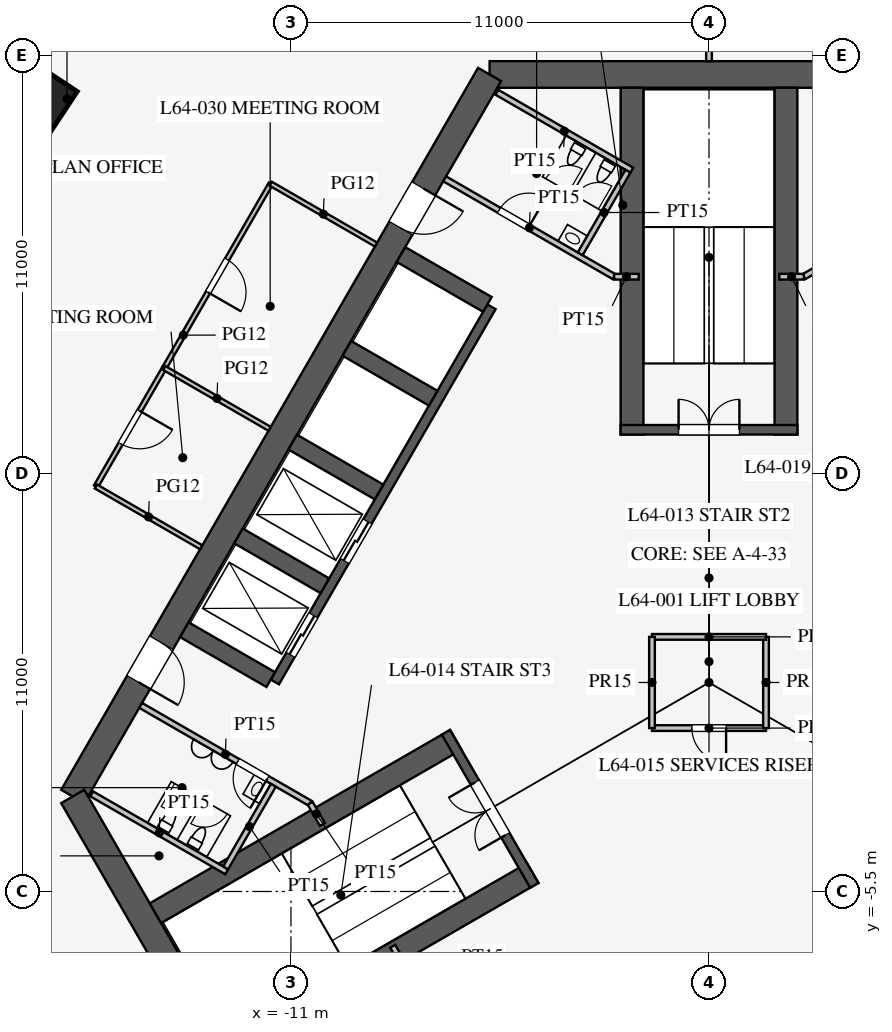
"""IFC4 building model, lengths in metres.
Left out: names, types, materials, properties, quantities, classifications, styles, units other than length and angle.
Written with IfcOpenShell. Run it as: python <this file> out.ifc"""

import sys

from ifc_helpers import new_model, si_unit, direction, frame, frame_2d, origin, origin_2d, place, context, subcontext, project, spatial, rectangle, extrude, element, fill, save


model = new_model("IFC4")
c1 = context("Model", 3, precision=1e-05, world=origin(), true_north=direction((0.0, 1.0)))
c2 = subcontext(c1, "Body", "Model", "MODEL_VIEW")
j1 = project(units=[si_unit("LENGTHUNIT", "METRE"), si_unit("PLANEANGLEUNIT", "RADIAN")], contexts=[c1])
p1 = place(None, origin())
s1 = spatial("IfcSite", under=j1, at=p1, CompositionType="ELEMENT")
p2 = place(p1, origin())
s2 = spatial("IfcBuilding", under=s1, at=p2, CompositionType="ELEMENT")
p3 = place(p2, frame((0.0, 0.0, 280.5)))
s3 = spatial("IfcBuildingStorey", under=s2, at=p3, CompositionType="ELEMENT", Elevation=280.5)
p4 = place(p3, frame((-17.594, 15.354, 0.0), z_axis=(0.0, 0.0, 1.0), x_axis=(-0.551523797289, -0.834159158089, 0.0)))
e1 = element("IfcColumn", 1, at=p4, inside=s3, PredefinedType="COLUMN", context=c2, shape_type="SweptSolid", body=[
    extrude(rectangle(XDim=1.4, YDim=1.4, at=origin_2d()), origin(), (0.0, 0.0, 1.0), 4.2),
])
p5 = place(p3, frame((5.773, 16.0, 0.0), z_axis=(0.0, 0.0, 1.0), x_axis=(-1.0, 0.0, 0.0)))
e2 = element("IfcWall", 2, at=p5, inside=s3, PredefinedType="SHEAR", context=c2, shape_type="SweptSolid", body=[
    extrude(rectangle(XDim=11.547, YDim=0.7, at=frame_2d((5.773, 0.0))), origin(), (0.0, 0.0, 1.0), 4.2),
])
p6 = place(p3, frame((-5.773, 16.0, 0.0), z_axis=(0.0, 0.0, 1.0), x_axis=(-0.500002442456, -0.866023993627, 0.0)))
e3 = element("IfcWall", 3, at=p6, inside=s3, PredefinedType="SHEAR", context=c2, shape_type="SweptSolid", body=[
    extrude(rectangle(XDim=21.939, YDim=0.7, at=frame_2d((10.97, 0.0))), origin(), (0.0, 0.0, 1.0), 4.2),
])
p7 = place(p6, frame((17.27, 0.0, 0.0)))
e4 = element("IfcOpeningElement", 4, at=p7, cuts=e3, PredefinedType="OPENING", context=c2, shape_type="SweptSolid", body=[
    extrude(rectangle(XDim=1.2, YDim=2.1, at=frame_2d((0.6, 1.05))), frame((0.0, 0.36, 0.0), z_axis=(0.0, -1.0, 0.0), x_axis=(1.0, 0.0, 0.0)), (0.0, 0.0, 1.0), 0.72),
])
p8 = place(p6, frame((3.47, 0.0, 0.0)))
e5 = element("IfcOpeningElement", 5, at=p8, cuts=e3, PredefinedType="OPENING", context=c2, shape_type="SweptSolid", body=[
    extrude(rectangle(XDim=1.2, YDim=2.1, at=frame_2d((0.6, 1.05))), frame((0.0, 0.36, 0.0), z_axis=(0.0, -1.0, 0.0), x_axis=(1.0, 0.0, 0.0)), (0.0, 0.0, 1.0), 0.72),
])
p9 = place(p3, frame((-16.743, -3.0, 0.0), z_axis=(0.0, 0.0, 1.0), x_axis=(0.499995765644, -0.866027848477, 0.0)))
e6 = element("IfcWall", 6, at=p9, inside=s3, PredefinedType="SHEAR", context=c2, shape_type="SweptSolid", body=[
    extrude(rectangle(XDim=11.547, YDim=0.7, at=frame_2d((5.773, 0.0))), origin(), (0.0, 0.0, 1.0), 4.2),
])
p10 = place(p3, frame((-5.724, 9.886, 0.0), z_axis=(0.0, 0.0, 1.0), x_axis=(-0.500001763848, -0.866024385424, 0.0)))
e7 = element("IfcWall", 7, at=p10, inside=s3, PredefinedType="SHEAR", context=c2, shape_type="SweptSolid", body=[
    extrude(rectangle(XDim=11.4, YDim=0.25, at=frame_2d((5.7, 0.0))), origin(), (0.0, 0.0, 1.0), 4.2),
])
p11 = place(p10, frame((6.525, 0.0, 0.0)))
e8 = element("IfcOpeningElement", 8, at=p11, cuts=e7, PredefinedType="OPENING", context=c2, shape_type="SweptSolid", body=[
    extrude(rectangle(XDim=1.2, YDim=2.2, at=frame_2d((0.6, 1.1))), frame((0.0, 0.135, 0.0), z_axis=(0.0, -1.0, 0.0), x_axis=(1.0, 0.0, 0.0)), (0.0, 0.0, 1.0), 0.27),
])
p12 = place(p10, frame((9.375, 0.0, 0.0)))
e9 = element("IfcOpeningElement", 9, at=p12, cuts=e7, PredefinedType="OPENING", context=c2, shape_type="SweptSolid", body=[
    extrude(rectangle(XDim=1.2, YDim=2.2, at=frame_2d((0.6, 1.1))), frame((0.0, 0.135, 0.0), z_axis=(0.0, -1.0, 0.0), x_axis=(1.0, 0.0, 0.0)), (0.0, 0.0, 1.0), 0.27),
])
for number, where, z_axis, x_axis in (
    (10, (-5.832, 9.949, 0.0), (0.0, 0.0, 1.0), (-0.866, 0.5, 0.0)),
    (11, (-7.257, 7.481, 0.0), (0.0, 0.0, 1.0), (-0.866, 0.5, 0.0)),
    (12, (-8.682, 5.012, 0.0), (0.0, 0.0, 1.0), (-0.866, 0.5, 0.0)),
    (13, (-10.107, 2.544, 0.0), (0.0, 0.0, 1.0), (-0.866, 0.5, 0.0)),
    (14, (-11.532, 0.076, 0.0), (0.0, 0.0, 1.0), (-0.866, 0.5, 0.0)),
):
    element("IfcWall", number, at=place(p3, frame(where, z_axis=z_axis, x_axis=x_axis)), inside=s3, PredefinedType="SHEAR", context=c2, shape_type="SweptSolid", body=[
        extrude(rectangle(XDim=2.625, YDim=0.45, at=frame_2d((1.312, 0.0))), origin(), (0.0, 0.0, 1.0), 4.2),
    ])
for number, where, z_axis, x_axis in (
    (15, (2.025, 6.525, 0.0), (0.0, 0.0, 1.0), (0.0, 1.0, 0.0)),
    (16, (-2.025, 6.525, 0.0), (0.0, 0.0, 1.0), (0.0, 1.0, 0.0)),
):
    element("IfcWall", number, at=place(p3, frame(where, z_axis=z_axis, x_axis=x_axis)), inside=s3, PredefinedType="SHEAR", context=c2, shape_type="SweptSolid", body=[
        extrude(rectangle(XDim=9.125, YDim=0.6, at=frame_2d((4.562, 0.0))), origin(), (0.0, 0.0, 1.0), 4.2),
    ])
p13 = place(p3, frame((2.325, 6.65, 0.0), z_axis=(0.0, 0.0, 1.0), x_axis=(-1.0, 0.0, 0.0)))
e17 = element("IfcWall", 17, at=p13, inside=s3, PredefinedType="SHEAR", context=c2, shape_type="SweptSolid", body=[
    extrude(rectangle(XDim=4.65, YDim=0.25, at=frame_2d((2.325, 0.0))), origin(), (0.0, 0.0, 1.0), 4.2),
])
p14 = place(p13, frame((1.525, 0.0, 0.0)))
e18 = element("IfcOpeningElement", 18, at=p14, cuts=e17, PredefinedType="OPENING", context=c2, shape_type="SweptSolid", body=[
    extrude(rectangle(XDim=1.6, YDim=2.1, at=frame_2d((0.8, 1.05))), frame((0.0, 0.135, 0.0), z_axis=(0.0, -1.0, 0.0), x_axis=(1.0, 0.0, 0.0)), (0.0, 0.0, 1.0), 0.27),
])
for number, where, z_axis, x_axis in (
    (19, (-6.663, -1.509, 0.0), (0.0, 0.0, 1.0), (-0.866, -0.5, 0.0)),
    (20, (-4.638, -5.016, 0.0), (0.0, 0.0, 1.0), (-0.866, -0.5, 0.0)),
):
    element("IfcWall", number, at=place(p3, frame(where, z_axis=z_axis, x_axis=x_axis)), inside=s3, PredefinedType="SHEAR", context=c2, shape_type="SweptSolid", body=[
        extrude(rectangle(XDim=9.125, YDim=0.6, at=frame_2d((4.562, 0.0))), origin(), (0.0, 0.0, 1.0), 4.2),
    ])
p15 = place(p3, frame((-6.922, -1.312, 0.0), z_axis=(0.0, 0.0, 1.0), x_axis=(0.499984536904, -0.866034331223, 0.0)))
e21 = element("IfcWall", 21, at=p15, inside=s3, PredefinedType="SHEAR", context=c2, shape_type="SweptSolid", body=[
    extrude(rectangle(XDim=4.65, YDim=0.25, at=frame_2d((2.325, 0.0))), origin(), (0.0, 0.0, 1.0), 4.2),
])
p16 = place(p15, frame((1.525, 0.0, 0.0)))
e22 = element("IfcOpeningElement", 22, at=p16, cuts=e21, PredefinedType="OPENING", context=c2, shape_type="SweptSolid", body=[
    extrude(rectangle(XDim=1.6, YDim=2.1, at=frame_2d((0.8, 1.05))), frame((0.0, 0.135, 0.0), z_axis=(0.0, -1.0, 0.0), x_axis=(1.0, 0.0, 0.0)), (0.0, 0.0, 1.0), 0.27),
])
p17 = place(p3, frame((2.495, 10.678, 0.0), z_axis=(0.0, 0.0, 1.0), x_axis=(0.866037967349, 0.499978238636, 0.0)))
e23 = element("IfcWall", 23, at=p17, inside=s3, PredefinedType="PARTITIONING", context=c2, shape_type="SweptSolid", body=[
    extrude(rectangle(XDim=5.15, YDim=0.15, at=frame_2d((2.575, 0.0))), origin(), (0.0, 0.0, 1.0), 4.0),
])
p18 = place(p17, frame((2.6, 0.0, 0.0)))
e24 = element("IfcOpeningElement", 24, at=p18, cuts=e23, PredefinedType="OPENING", context=c2, shape_type="SweptSolid", body=[
    extrude(rectangle(XDim=0.9, YDim=2.1, at=frame_2d((0.45, 1.05))), frame((0.0, 0.085, 0.0), z_axis=(0.0, -1.0, 0.0), x_axis=(1.0, 0.0, 0.0)), (0.0, 0.0, 1.0), 0.17),
])
p19 = place(p3, frame((-10.495, -3.178, 0.0), z_axis=(0.0, 0.0, 1.0), x_axis=(-0.866037967349, 0.499978238636, 0.0)))
e25 = element("IfcWall", 25, at=p19, inside=s3, PredefinedType="PARTITIONING", context=c2, shape_type="SweptSolid", body=[
    extrude(rectangle(XDim=5.15, YDim=0.15, at=frame_2d((2.575, 0.0))), origin(), (0.0, 0.0, 1.0), 4.0),
])
p20 = place(p19, frame((1.3, 0.0, 0.0)))
e26 = element("IfcOpeningElement", 26, at=p20, cuts=e25, PredefinedType="OPENING", context=c2, shape_type="SweptSolid", body=[
    extrude(rectangle(XDim=0.9, YDim=2.1, at=frame_2d((0.45, 1.05))), frame((0.0, 0.085, 0.0), z_axis=(0.0, -1.0, 0.0), x_axis=(1.0, 0.0, 0.0)), (0.0, 0.0, 1.0), 0.17),
])
p21 = place(p3, frame((-2.495, 10.678, 0.0), z_axis=(0.0, 0.0, 1.0), x_axis=(-0.866037967349, 0.499978238636, 0.0)))
e27 = element("IfcWall", 27, at=p21, inside=s3, PredefinedType="PARTITIONING", context=c2, shape_type="SweptSolid", body=[
    extrude(rectangle(XDim=5.15, YDim=0.15, at=frame_2d((2.575, 0.0))), origin(), (0.0, 0.0, 1.0), 4.0),
])
p22 = place(p21, frame((2.6, 0.0, 0.0)))
e28 = element("IfcOpeningElement", 28, at=p22, cuts=e27, PredefinedType="OPENING", context=c2, shape_type="SweptSolid", body=[
    extrude(rectangle(XDim=0.9, YDim=2.1, at=frame_2d((0.45, 1.05))), frame((0.0, 0.085, 0.0), z_axis=(0.0, -1.0, 0.0), x_axis=(1.0, 0.0, 0.0)), (0.0, 0.0, 1.0), 0.17),
])
for number, where, z_axis, x_axis in (
    (29, (2.495, 10.678, 0.0), (0.0, 0.0, 1.0), (-1.0, 0.0, 0.0)),
    (30, (-2.495, 10.678, 0.0), (0.0, 0.0, 1.0), (1.0, 0.0, 0.0)),
):
    element("IfcWall", number, at=place(p3, frame(where, z_axis=z_axis, x_axis=x_axis)), inside=s3, PredefinedType="PARTITIONING", context=c2, shape_type="SweptSolid", body=[
        extrude(rectangle(XDim=0.645, YDim=0.15, at=frame_2d((0.323, 0.0))), origin(), (0.0, 0.0, 1.0), 4.0),
    ])
for number, where, z_axis, x_axis in (
    (31, (-10.495, -3.178, 0.0), (0.0, 0.0, 1.0), (0.5, -0.866, 0.0)),
    (32, (-8.0, -7.5, 0.0), (0.0, 0.0, 1.0), (-0.5, 0.866, 0.0)),
):
    element("IfcWall", number, at=place(p3, frame(where, z_axis=z_axis, x_axis=x_axis)), inside=s3, PredefinedType="PARTITIONING", context=c2, shape_type="SweptSolid", body=[
        extrude(rectangle(XDim=0.645, YDim=0.15, at=frame_2d((0.323, 0.0))), origin(), (0.0, 0.0, 1.0), 4.0),
    ])
p23 = place(p3, frame((-2.031, 13.482, 0.0), z_axis=(0.0, 0.0, 1.0), x_axis=(-0.866050731258, 0.499956128963, 0.0)))
e33 = element("IfcWall", 33, at=p23, inside=s3, PredefinedType="PARTITIONING", context=c2, shape_type="SweptSolid", body=[
    extrude(rectangle(XDim=4.1, YDim=0.15, at=frame_2d((2.05, 0.0))), origin(), (0.0, 0.0, 1.0), 4.0),
])
p24 = place(p3, frame((-3.389, 11.281, 0.0), z_axis=(0.0, 0.0, 1.0), x_axis=(0.499989096993, 0.866031698547, 0.0)))
e34 = element("IfcWall", 34, at=p24, inside=s3, PredefinedType="PARTITIONING", context=c2, shape_type="SweptSolid", body=[
    extrude(rectangle(XDim=2.51, YDim=0.15, at=frame_2d((1.255, 0.0))), origin(), (0.0, 0.0, 1.0), 4.0),
])
p25 = place(p3, frame((-12.691, -4.982, 0.0), z_axis=(0.0, 0.0, 1.0), x_axis=(-0.8660249478, 0.500000789788, 0.0)))
e35 = element("IfcWall", 35, at=p25, inside=s3, PredefinedType="PARTITIONING", context=c2, shape_type="SweptSolid", body=[
    extrude(rectangle(XDim=4.1, YDim=0.15, at=frame_2d((2.05, 0.0))), origin(), (0.0, 0.0, 1.0), 4.0),
])
p26 = place(p3, frame((-11.464, -2.706, 0.0), z_axis=(0.0, 0.0, 1.0), x_axis=(-0.50001992892, -0.866013897511, 0.0)))
e36 = element("IfcWall", 36, at=p26, inside=s3, PredefinedType="PARTITIONING", context=c2, shape_type="SweptSolid", body=[
    extrude(rectangle(XDim=2.51, YDim=0.15, at=frame_2d((1.255, 0.0))), origin(), (0.0, 0.0, 1.0), 4.0),
])
p27 = place(p3, frame((-1.5, -1.2, 0.0), z_axis=(0.0, 0.0, 1.0), x_axis=(1.0, 0.0, 0.0)))
e37 = element("IfcWall", 37, at=p27, inside=s3, PredefinedType="PARTITIONING", context=c2, shape_type="SweptSolid", body=[
    extrude(rectangle(XDim=3.0, YDim=0.15, at=frame_2d((1.5, 0.0))), origin(), (0.0, 0.0, 1.0), 4.0),
])
p28 = place(p27, frame((1.05, 0.0, 0.0)))
e38 = element("IfcOpeningElement", 38, at=p28, cuts=e37, PredefinedType="OPENING", context=c2, shape_type="SweptSolid", body=[
    extrude(rectangle(XDim=0.9, YDim=2.1, at=frame_2d((0.45, 1.05))), frame((0.0, 0.085, 0.0), z_axis=(0.0, -1.0, 0.0), x_axis=(1.0, 0.0, 0.0)), (0.0, 0.0, 1.0), 0.17),
])
p29 = place(p3, frame((1.5, -1.2, 0.0), z_axis=(0.0, 0.0, 1.0), x_axis=(0.0, 1.0, 0.0)))
e39 = element("IfcWall", 39, at=p29, inside=s3, PredefinedType="PARTITIONING", context=c2, shape_type="SweptSolid", body=[
    extrude(rectangle(XDim=2.4, YDim=0.15, at=frame_2d((1.2, 0.0))), origin(), (0.0, 0.0, 1.0), 4.0),
])
p30 = place(p3, frame((1.5, 1.2, 0.0), z_axis=(0.0, 0.0, 1.0), x_axis=(-1.0, 0.0, 0.0)))
e40 = element("IfcWall", 40, at=p30, inside=s3, PredefinedType="PARTITIONING", context=c2, shape_type="SweptSolid", body=[
    extrude(rectangle(XDim=3.0, YDim=0.15, at=frame_2d((1.5, 0.0))), origin(), (0.0, 0.0, 1.0), 4.0),
])
p31 = place(p3, frame((-1.5, 1.2, 0.0), z_axis=(0.0, 0.0, 1.0), x_axis=(0.0, -1.0, 0.0)))
e41 = element("IfcWall", 41, at=p31, inside=s3, PredefinedType="PARTITIONING", context=c2, shape_type="SweptSolid", body=[
    extrude(rectangle(XDim=2.4, YDim=0.15, at=frame_2d((1.2, 0.0))), origin(), (0.0, 0.0, 1.0), 4.0),
])
p32 = place(p3, frame((0.0, 16.35, 0.0), z_axis=(0.0, 0.0, 1.0), x_axis=(0.0, 1.0, 0.0)))
e42 = element("IfcWall", 42, at=p32, inside=s3, PredefinedType="PARTITIONING", context=c2, shape_type="SweptSolid", body=[
    extrude(rectangle(XDim=13.4, YDim=0.15, at=frame_2d((6.7, 0.0))), origin(), (0.0, 0.0, 1.0), 2.5),
])
p33 = place(p3, frame((-14.333, 8.275, 0.0), z_axis=(0.0, 0.0, 1.0), x_axis=(-0.500012057535, -0.866018442252, 0.0)))
e43 = element("IfcWall", 43, at=p33, inside=s3, PredefinedType="PARTITIONING", context=c2, shape_type="SweptSolid", body=[
    extrude(rectangle(XDim=3.6, YDim=0.12, at=frame_2d((1.8, 0.0))), origin(), (0.0, 0.0, 1.0), 2.9),
])
p34 = place(p33, frame((1.3, 0.0, 0.15)))
e44 = element("IfcOpeningElement", 44, at=p34, cuts=e43, PredefinedType="OPENING", context=c2, shape_type="SweptSolid", body=[
    extrude(rectangle(XDim=1.0, YDim=2.1, at=frame_2d((0.5, 1.05))), frame((0.0, 0.07, 0.0), z_axis=(0.0, -1.0, 0.0), x_axis=(1.0, 0.0, 0.0)), (0.0, 0.0, 1.0), 0.14),
])
p35 = place(p3, frame((-11.533, 13.125, 0.0), z_axis=(0.0, 0.0, 1.0), x_axis=(-0.49999793692, -0.866026594901, 0.0)))
e45 = element("IfcWall", 45, at=p35, inside=s3, PredefinedType="PARTITIONING", context=c2, shape_type="SweptSolid", body=[
    extrude(rectangle(XDim=5.6, YDim=0.12, at=frame_2d((2.8, 0.0))), origin(), (0.0, 0.0, 1.0), 2.9),
])
p36 = place(p35, frame((2.3, 0.0, 0.15)))
e46 = element("IfcOpeningElement", 46, at=p36, cuts=e45, PredefinedType="OPENING", context=c2, shape_type="SweptSolid", body=[
    extrude(rectangle(XDim=1.0, YDim=2.1, at=frame_2d((0.5, 1.05))), frame((0.0, 0.07, 0.0), z_axis=(0.0, -1.0, 0.0), x_axis=(1.0, 0.0, 0.0)), (0.0, 0.0, 1.0), 0.14),
])
p37 = place(p3, frame((-13.361, 3.557, 0.0), z_axis=(0.0, 0.0, 1.0), x_axis=(-0.866061088033, 0.499938187974, 0.0)))
e47 = element("IfcWall", 47, at=p37, inside=s3, PredefinedType="PARTITIONING", context=c2, shape_type="SweptSolid", body=[
    extrude(rectangle(XDim=3.2, YDim=0.12, at=frame_2d((1.6, 0.0))), origin(), (0.0, 0.0, 1.0), 2.9),
])
for number, where, z_axis, x_axis in (
    (48, (-11.562, 6.675, 0.0), (0.0, 0.0, 1.0), (-0.866, 0.5, 0.0)),
    (49, (-8.761, 11.525, 0.0), (0.0, 0.0, 1.0), (-0.866, 0.5, 0.0)),
):
    element("IfcWall", number, at=place(p3, frame(where, z_axis=z_axis, x_axis=x_axis)), inside=s3, PredefinedType="PARTITIONING", context=c2, shape_type="SweptSolid", body=[
        extrude(rectangle(XDim=3.2, YDim=0.12, at=frame_2d((1.6, 0.0))), origin(), (0.0, 0.0, 1.0), 2.9),
    ])
p38 = place(p20, origin())
e50 = element("IfcDoor", 50, at=p38, inside=s3, OperationType="SINGLE_SWING_LEFT", PredefinedType="DOOR", context=c2, shape_type="SweptSolid", body=[
    extrude(rectangle(XDim=0.9, YDim=2.1, at=frame_2d((0.45, 1.05))), frame((0.0, 0.025, 0.0), z_axis=(0.0, -1.0, 0.0), x_axis=(1.0, 0.0, 0.0)), (0.0, 0.0, 1.0), 0.05),
])
fill(e26, e50)
p39 = place(p22, frame((0.9, 0.0, 0.0), z_axis=(0.0, 0.0, 1.0), x_axis=(-1.0, 0.0, 0.0)))
e51 = element("IfcDoor", 51, at=p39, inside=s3, OperationType="SINGLE_SWING_RIGHT", PredefinedType="DOOR", context=c2, shape_type="SweptSolid", body=[
    extrude(rectangle(XDim=0.9, YDim=2.1, at=frame_2d((0.45, 1.05))), frame((0.0, 0.025, 0.0), z_axis=(0.0, -1.0, 0.0), x_axis=(1.0, 0.0, 0.0)), (0.0, 0.0, 1.0), 0.05),
])
fill(e28, e51)
p40 = place(p28, frame((0.9, 0.0, 0.0), z_axis=(0.0, 0.0, 1.0), x_axis=(-1.0, 0.0, 0.0)))
e52 = element("IfcDoor", 52, at=p40, inside=s3, OperationType="SINGLE_SWING_LEFT", PredefinedType="DOOR", context=c2, shape_type="SweptSolid", body=[
    extrude(rectangle(XDim=0.9, YDim=2.1, at=frame_2d((0.45, 1.05))), frame((0.0, 0.025, 0.0), z_axis=(0.0, -1.0, 0.0), x_axis=(1.0, 0.0, 0.0)), (0.0, 0.0, 1.0), 0.05),
])
fill(e38, e52)
p41 = place(p14, frame((1.6, 0.0, 0.0), z_axis=(0.0, 0.0, 1.0), x_axis=(-1.0, 0.0, 0.0)))
e53 = element("IfcDoor", 53, at=p41, inside=s3, OperationType="DOUBLE_DOOR_SINGLE_SWING", PredefinedType="DOOR", context=c2, shape_type="SweptSolid", body=[
    extrude(rectangle(XDim=1.6, YDim=2.1, at=frame_2d((0.8, 1.05))), frame((0.0, 0.025, 0.0), z_axis=(0.0, -1.0, 0.0), x_axis=(1.0, 0.0, 0.0)), (0.0, 0.0, 1.0), 0.05),
])
fill(e18, e53)
p42 = place(p16, frame((1.6, 0.0, 0.0), z_axis=(0.0, 0.0, 1.0), x_axis=(-1.0, 0.0, 0.0)))
e54 = element("IfcDoor", 54, at=p42, inside=s3, OperationType="DOUBLE_DOOR_SINGLE_SWING", PredefinedType="DOOR", context=c2, shape_type="SweptSolid", body=[
    extrude(rectangle(XDim=1.6, YDim=2.1, at=frame_2d((0.8, 1.05))), frame((0.0, 0.025, 0.0), z_axis=(0.0, -1.0, 0.0), x_axis=(1.0, 0.0, 0.0)), (0.0, 0.0, 1.0), 0.05),
])
fill(e22, e54)
p43 = place(p7, origin())
e55 = element("IfcDoor", 55, at=p43, inside=s3, OperationType="SINGLE_SWING_RIGHT", PredefinedType="DOOR", context=c2, shape_type="SweptSolid", body=[
    extrude(rectangle(XDim=1.2, YDim=2.1, at=frame_2d((0.6, 1.05))), frame((0.0, 0.025, 0.0), z_axis=(0.0, -1.0, 0.0), x_axis=(1.0, 0.0, 0.0)), (0.0, 0.0, 1.0), 0.05),
])
fill(e4, e55)
p44 = place(p8, origin())
e56 = element("IfcDoor", 56, at=p44, inside=s3, OperationType="SINGLE_SWING_LEFT", PredefinedType="DOOR", context=c2, shape_type="SweptSolid", body=[
    extrude(rectangle(XDim=1.2, YDim=2.1, at=frame_2d((0.6, 1.05))), frame((0.0, 0.025, 0.0), z_axis=(0.0, -1.0, 0.0), x_axis=(1.0, 0.0, 0.0)), (0.0, 0.0, 1.0), 0.05),
])
fill(e5, e56)
p45 = place(p36, origin())
e57 = element("IfcDoor", 57, at=p45, inside=s3, OperationType="SINGLE_SWING_RIGHT", PredefinedType="DOOR", context=c2, shape_type="SweptSolid", body=[
    extrude(rectangle(XDim=1.0, YDim=2.1, at=frame_2d((0.5, 1.05))), frame((0.0, 0.025, 0.0), z_axis=(0.0, -1.0, 0.0), x_axis=(1.0, 0.0, 0.0)), (0.0, 0.0, 1.0), 0.05),
])
fill(e46, e57)
p46 = place(p34, origin())
e58 = element("IfcDoor", 58, at=p46, inside=s3, OperationType="SINGLE_SWING_LEFT", PredefinedType="DOOR", context=c2, shape_type="SweptSolid", body=[
    extrude(rectangle(XDim=1.0, YDim=2.1, at=frame_2d((0.5, 1.05))), frame((0.0, 0.025, 0.0), z_axis=(0.0, -1.0, 0.0), x_axis=(1.0, 0.0, 0.0)), (0.0, 0.0, 1.0), 0.05),
])
fill(e44, e58)
p47 = place(p11, origin())
e59 = element("IfcDoor", 59, at=p47, inside=s3, OperationType="DOUBLE_DOOR_SLIDING", PredefinedType="DOOR", context=c2, shape_type="SweptSolid", body=[
    extrude(rectangle(XDim=1.2, YDim=2.2, at=frame_2d((0.6, 1.1))), frame((0.0, 0.025, 0.0), z_axis=(0.0, -1.0, 0.0), x_axis=(1.0, 0.0, 0.0)), (0.0, 0.0, 1.0), 0.05),
])
fill(e8, e59)
p48 = place(p12, origin())
e60 = element("IfcDoor", 60, at=p48, inside=s3, OperationType="DOUBLE_DOOR_SLIDING", PredefinedType="DOOR", context=c2, shape_type="SweptSolid", body=[
    extrude(rectangle(XDim=1.2, YDim=2.2, at=frame_2d((0.6, 1.1))), frame((0.0, 0.025, 0.0), z_axis=(0.0, -1.0, 0.0), x_axis=(1.0, 0.0, 0.0)), (0.0, 0.0, 1.0), 0.05),
])
fill(e9, e60)
save(model, sys.argv[1])
